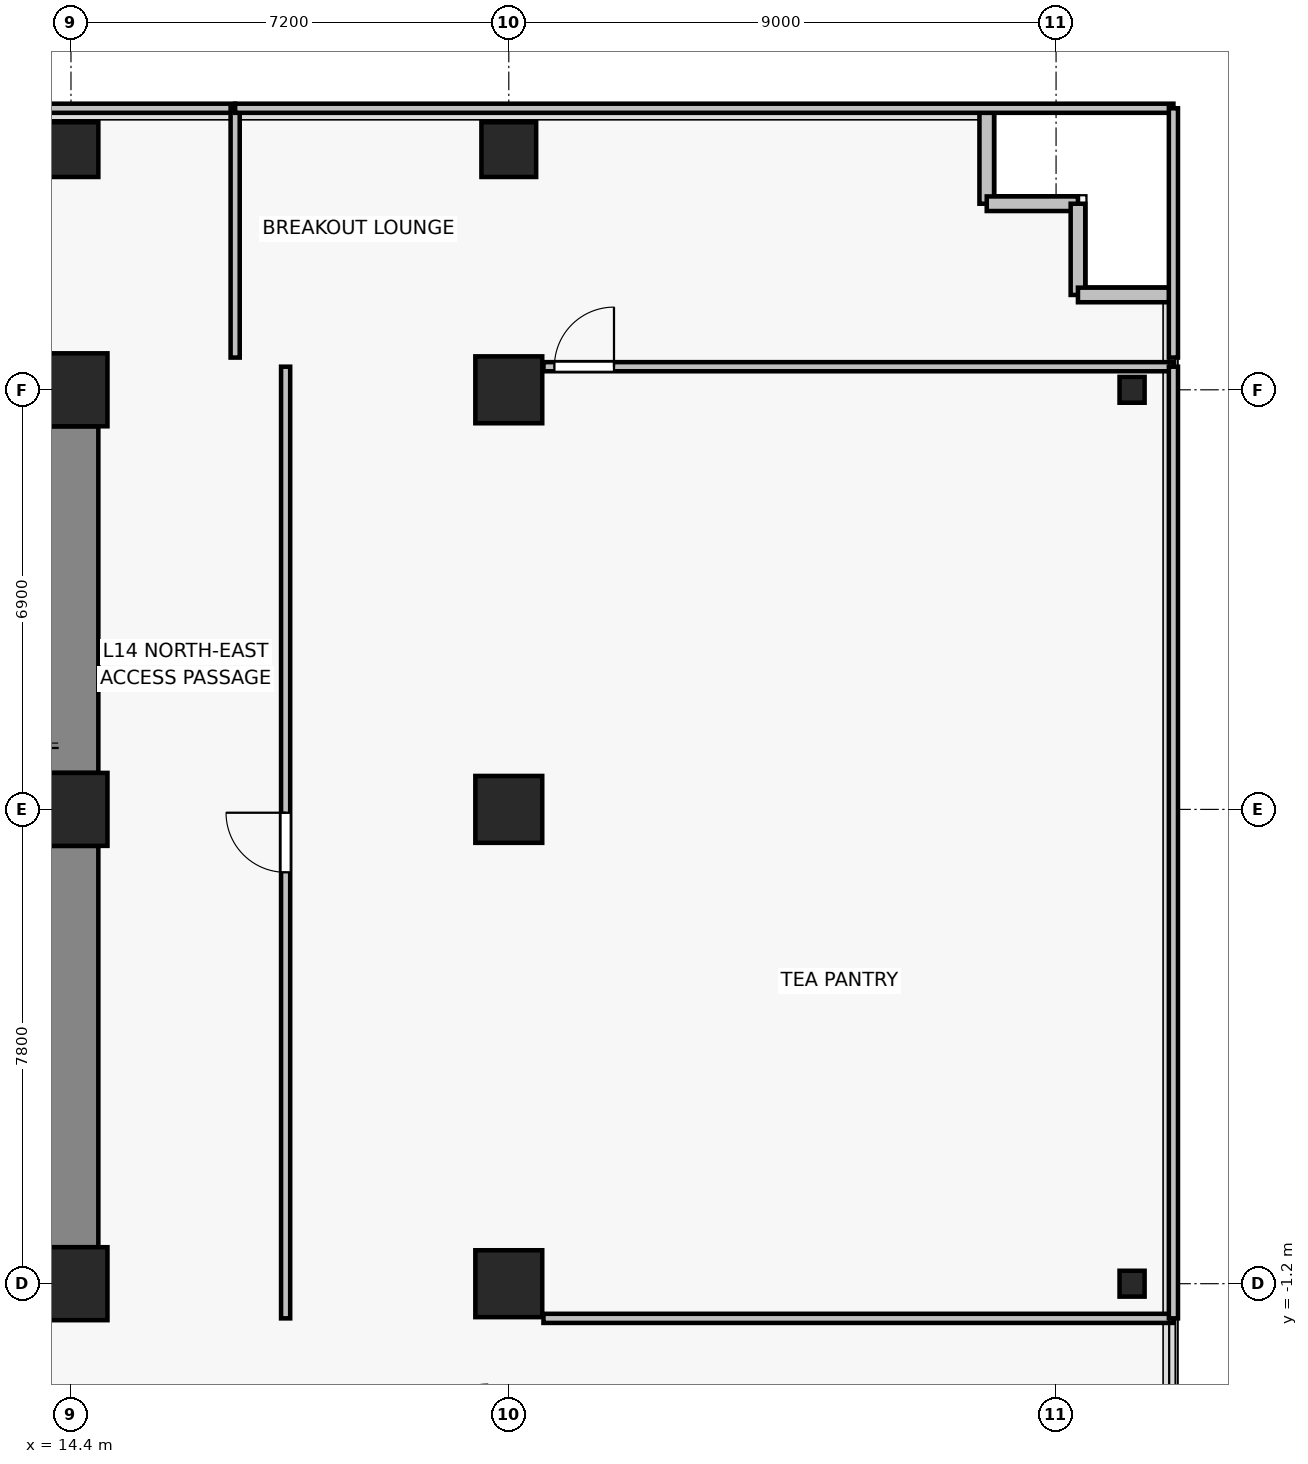
"""IFC4 building model, lengths in metres.
Left out: names, types, materials, properties, quantities, classifications, styles, units other than length and angle.
Written with IfcOpenShell. Run it as: python <this file> out.ifc"""

import sys

from ifc_helpers import new_model, si_unit, direction, frame, frame_2d, origin, origin_2d, place, context, subcontext, project, spatial, rectangle, i_section, extrude, source, transform, mapped, element, fill, save


model = new_model("IFC4")
c1 = context("Model", 3, precision=1e-05, world=origin(), true_north=direction((0.0, 1.0)))
c2 = subcontext(c1, "Body", "Model", "MODEL_VIEW")
j1 = project(units=[si_unit("LENGTHUNIT", "METRE"), si_unit("PLANEANGLEUNIT", "RADIAN")], contexts=[c1])
p1 = place(None, origin())
s1 = spatial("IfcSite", under=j1, at=p1, CompositionType="ELEMENT")
p2 = place(p1, origin())
s2 = spatial("IfcBuilding", under=s1, at=p2, CompositionType="ELEMENT")
p3 = place(p2, frame((0.0, 0.0, 53.8)))
s3 = spatial("IfcBuildingStorey", under=s2, at=p3, CompositionType="ELEMENT", Elevation=53.8)
for number, where, z_axis, x_axis in (
    (1, (14.4, -1.2, 0.0), (0.0, 0.0, 1.0), (1.0, 0.0, 0.0)),
    (2, (14.4, 6.6, 0.0), (0.0, 0.0, 1.0), (1.0, 0.0, 0.0)),
    (3, (14.4, 13.5, 0.0), (0.0, 0.0, 1.0), (1.0, 0.0, 0.0)),
):
    element("IfcColumn", number, at=place(p3, frame(where, z_axis=z_axis, x_axis=x_axis)), inside=s3, PredefinedType="COLUMN", context=c2, shape_type="SweptSolid", body=[
        extrude(rectangle(XDim=1.2, YDim=1.2, at=origin_2d()), origin(), (0.0, 0.0, 1.0), 3.3),
    ])
for number, where, z_axis, x_axis in (
    (4, (21.6, -1.2, 0.0), (0.0, 0.0, 1.0), (1.0, 0.0, 0.0)),
    (5, (21.6, 6.6, 0.0), (0.0, 0.0, 1.0), (1.0, 0.0, 0.0)),
    (6, (21.6, 13.5, 0.0), (0.0, 0.0, 1.0), (1.0, 0.0, 0.0)),
):
    element("IfcColumn", number, at=place(p3, frame(where, z_axis=z_axis, x_axis=x_axis)), inside=s3, PredefinedType="COLUMN", context=c2, shape_type="SweptSolid", body=[
        extrude(rectangle(XDim=1.1, YDim=1.1, at=origin_2d()), origin(), (0.0, 0.0, 1.0), 3.3),
    ])
for number, where, z_axis, x_axis in (
    (7, (14.4, 17.45, 0.0), (0.0, 0.0, 1.0), (1.0, 0.0, 0.0)),
    (8, (21.6, 17.45, 0.0), (0.0, 0.0, 1.0), (1.0, 0.0, 0.0)),
):
    element("IfcColumn", number, at=place(p3, frame(where, z_axis=z_axis, x_axis=x_axis)), inside=s3, PredefinedType="COLUMN", context=c2, shape_type="SweptSolid", body=[
        extrude(rectangle(XDim=0.9, YDim=0.9, at=origin_2d()), origin(), (0.0, 0.0, 1.0), 3.3),
    ])
for number, where, z_axis, x_axis in (
    (9, (31.85, -1.2, 0.0), (0.0, 0.0, 1.0), (1.0, 0.0, 0.0)),
    (10, (31.85, 13.5, 0.0), (0.0, 0.0, 1.0), (1.0, 0.0, 0.0)),
):
    element("IfcColumn", number, at=place(p3, frame(where, z_axis=z_axis, x_axis=x_axis)), inside=s3, PredefinedType="COLUMN", context=c2, shape_type="SweptSolid", body=[
        extrude(i_section(OverallWidth=0.412, OverallDepth=0.425, WebThickness=0.026, FlangeThickness=0.039, FilletRadius=0.015, at=origin_2d()), origin(), (0.0, 0.0, 1.0), 3.3),
    ])
p4 = place(p3, frame((14.4, -0.6, 0.0), z_axis=(0.0, 0.0, 1.0), x_axis=(0.0, 1.0, 0.0)))
e11 = element("IfcWall", 11, at=p4, inside=s3, PredefinedType="SHEAR", context=c2, shape_type="SweptSolid", body=[
    extrude(rectangle(XDim=6.6, YDim=0.9, at=frame_2d((3.3, 0.0))), origin(), (0.0, 0.0, 1.0), 3.075),
])
p5 = place(p3, frame((14.4, 7.2, 0.0), z_axis=(0.0, 0.0, 1.0), x_axis=(0.0, 1.0, 0.0)))
e12 = element("IfcWall", 12, at=p5, inside=s3, PredefinedType="SHEAR", context=c2, shape_type="SweptSolid", body=[
    extrude(rectangle(XDim=5.7, YDim=0.9, at=frame_2d((2.85, 0.0))), origin(), (0.0, 0.0, 1.0), 3.075),
])
for number, where, z_axis, x_axis in (
    (13, (29.46, 16.56, 0.0), (0.0, 0.0, 1.0), (0.0, 1.0, 0.0)),
    (14, (30.96, 16.56, 0.0), (0.0, 0.0, 1.0), (-1.0, 0.0, 0.0)),
    (15, (30.96, 15.06, 0.0), (0.0, 0.0, 1.0), (0.0, 1.0, 0.0)),
    (16, (32.46, 15.06, 0.0), (0.0, 0.0, 1.0), (-1.0, 0.0, 0.0)),
):
    element("IfcWall", number, at=place(p3, frame(where, z_axis=z_axis, x_axis=x_axis)), inside=s3, PredefinedType="SOLIDWALL", context=c2, shape_type="SweptSolid", body=[
        extrude(rectangle(XDim=1.5, YDim=0.24, at=frame_2d((0.75, 0.0))), origin(), (0.0, 0.0, 1.0), 3.075),
    ])
p6 = place(p3, frame((32.53, -1.77, 0.0), z_axis=(0.0, 0.0, 1.0), x_axis=(-1.0, 0.0, 0.0)))
e17 = element("IfcWall", 17, at=p6, inside=s3, PredefinedType="PARTITIONING", context=c2, shape_type="SweptSolid", body=[
    extrude(rectangle(XDim=10.36, YDim=0.15, at=frame_2d((5.18, 0.0))), origin(), (0.0, 0.0, 1.0), 2.465),
])
p7 = place(p3, frame((22.17, 13.88, 0.0), z_axis=(0.0, 0.0, 1.0), x_axis=(1.0, 0.0, 0.0)))
e18 = element("IfcWall", 18, at=p7, inside=s3, PredefinedType="PARTITIONING", context=c2, shape_type="SweptSolid", body=[
    extrude(rectangle(XDim=10.36, YDim=0.15, at=frame_2d((5.18, 0.0))), origin(), (0.0, 0.0, 1.0), 3.075),
])
p8 = place(p7, frame((0.18, 0.0, 0.0)))
e19 = element("IfcOpeningElement", 19, at=p8, cuts=e18, PredefinedType="OPENING", context=c2, shape_type="SweptSolid", body=[
    extrude(rectangle(XDim=0.98, YDim=2.15, at=frame_2d((0.49, 1.075))), frame((0.0, 0.085, 0.0), z_axis=(0.0, -1.0, 0.0), x_axis=(1.0, 0.0, 0.0)), (0.0, 0.0, 1.0), 0.17),
])
p9 = place(p3, frame((17.93, -1.77, 0.0), z_axis=(0.0, 0.0, 1.0), x_axis=(0.0, 1.0, 0.0)))
e20 = element("IfcWall", 20, at=p9, inside=s3, PredefinedType="PARTITIONING", context=c2, shape_type="SweptSolid", body=[
    extrude(rectangle(XDim=15.65, YDim=0.15, at=frame_2d((7.825, 0.0))), origin(), (0.0, 0.0, 1.0), 2.465),
])
p10 = place(p9, frame((7.335, 0.0, 0.0)))
e21 = element("IfcOpeningElement", 21, at=p10, cuts=e20, PredefinedType="OPENING", context=c2, shape_type="SweptSolid", body=[
    extrude(rectangle(XDim=0.98, YDim=2.15, at=frame_2d((0.49, 1.075))), frame((0.0, 0.085, 0.0), z_axis=(0.0, -1.0, 0.0), x_axis=(1.0, 0.0, 0.0)), (0.0, 0.0, 1.0), 0.17),
])
p11 = place(p3, frame((32.53, 13.88, 0.0), z_axis=(0.0, 0.0, 1.0), x_axis=(0.0, -1.0, 0.0)))
e22 = element("IfcWall", 22, at=p11, inside=s3, PredefinedType="PARTITIONING", context=c2, shape_type="SweptSolid", body=[
    extrude(rectangle(XDim=15.65, YDim=0.15, at=frame_2d((7.825, 0.0))), origin(), (0.0, 0.0, 1.0), 3.075),
])
p12 = place(p3, frame((-28.53, 18.13, 0.0), z_axis=(0.0, 0.0, 1.0), x_axis=(1.0, 0.0, 0.0)))
e23 = element("IfcWall", 23, at=p12, inside=s3, PredefinedType="PARTITIONING", context=c2, shape_type="SweptSolid", body=[
    extrude(rectangle(XDim=45.63, YDim=0.15, at=frame_2d((22.815, 0.0))), origin(), (0.0, 0.0, 1.0), 3.075),
])
p13 = place(p3, frame((17.1, 18.13, 0.0), z_axis=(0.0, 0.0, 1.0), x_axis=(0.0, -1.0, 0.0)))
e24 = element("IfcWall", 24, at=p13, inside=s3, PredefinedType="PARTITIONING", context=c2, shape_type="SweptSolid", body=[
    extrude(rectangle(XDim=4.1, YDim=0.15, at=frame_2d((2.05, 0.0))), origin(), (0.0, 0.0, 1.0), 2.465),
])
p14 = place(p3, frame((17.1, 18.13, 0.0), z_axis=(0.0, 0.0, 1.0), x_axis=(1.0, 0.0, 0.0)))
e25 = element("IfcWall", 25, at=p14, inside=s3, PredefinedType="PARTITIONING", context=c2, shape_type="SweptSolid", body=[
    extrude(rectangle(XDim=15.43, YDim=0.15, at=frame_2d((7.715, 0.0))), origin(), (0.0, 0.0, 1.0), 3.075),
])
p15 = place(p3, frame((32.53, 18.13, 0.0), z_axis=(0.0, 0.0, 1.0), x_axis=(0.0, -1.0, 0.0)))
e26 = element("IfcWall", 26, at=p15, inside=s3, PredefinedType="PARTITIONING", context=c2, shape_type="SweptSolid", body=[
    extrude(rectangle(XDim=4.1, YDim=0.15, at=frame_2d((2.05, 0.0))), origin(), (0.0, 0.0, 1.0), 3.075),
])
m1 = source(origin(), c2, "Body", "SweptSolid", [
    extrude(rectangle(XDim=0.98, YDim=2.15, at=frame_2d((0.49, 1.075))), frame((0.0, 0.025, 0.0), z_axis=(0.0, -1.0, 0.0), x_axis=(1.0, 0.0, 0.0)), (0.0, 0.0, 1.0), 0.05),
])
p16 = place(p10, origin())
e27 = element("IfcDoor", 27, at=p16, inside=s3, OperationType="SINGLE_SWING_RIGHT", PredefinedType="DOOR", context=c2, shape_type="MappedRepresentation", body=[
    mapped(m1, transform((0.0, 0.0, 0.0), x_axis=(1.0, 0.0, 0.0), y_axis=(0.0, 1.0, 0.0), z_axis=(0.0, 0.0, 1.0), scale=1.0)),
])
fill(e21, e27)
p17 = place(p8, origin())
e28 = element("IfcDoor", 28, at=p17, inside=s3, OperationType="SINGLE_SWING_RIGHT", PredefinedType="DOOR", context=c2, shape_type="MappedRepresentation", body=[
    mapped(m1, transform((0.0, 0.0, 0.0), x_axis=(1.0, 0.0, 0.0), y_axis=(0.0, 1.0, 0.0), z_axis=(0.0, 0.0, 1.0), scale=1.0)),
])
fill(e19, e28)
save(model, sys.argv[1])
